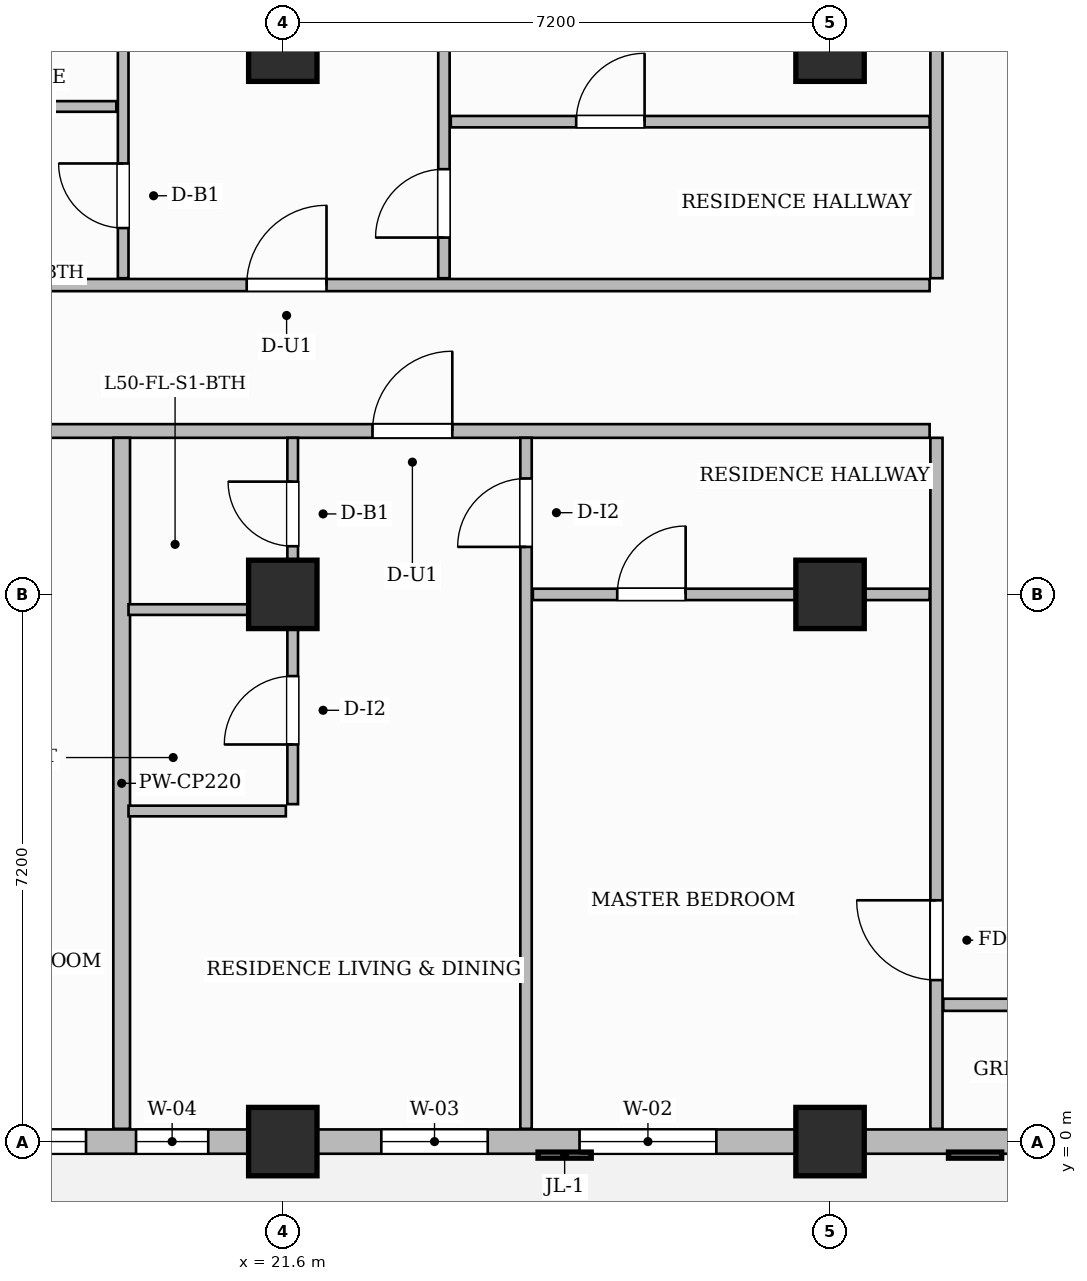
"""IFC4 building model, lengths in metres.
Left out: names, types, materials, properties, quantities, classifications, styles, units other than length and angle.
Written with IfcOpenShell. Run it as: python <this file> out.ifc"""

import sys

from ifc_helpers import new_model, si_unit, direction, frame, frame_2d, origin, origin_2d, place, context, subcontext, project, spatial, rectangle, extrude, source, transform, mapped, element, fill, save


model = new_model("IFC4")
c1 = context("Model", 3, precision=1e-05, world=origin(), true_north=direction((0.0, 1.0)))
c2 = subcontext(c1, "Body", "Model", "MODEL_VIEW")
j1 = project(units=[si_unit("LENGTHUNIT", "METRE"), si_unit("PLANEANGLEUNIT", "RADIAN")], contexts=[c1])
p1 = place(None, origin())
s1 = spatial("IfcSite", under=j1, at=p1, CompositionType="ELEMENT")
p2 = place(p1, origin())
s2 = spatial("IfcBuilding", under=s1, at=p2, CompositionType="ELEMENT")
p3 = place(p2, frame((0.0, 0.0, 201.9)))
s3 = spatial("IfcBuildingStorey", under=s2, at=p3, CompositionType="ELEMENT", Elevation=201.9)
m1 = source(origin(), c2, "Body", "SweptSolid", [
    extrude(rectangle(XDim=0.9, YDim=0.9, at=origin_2d()), origin(), (0.0, 0.0, 1.0), 3.85),
])
for number, where, z_axis, x_axis in (
    (1, (21.6, 0.0, 0.0), (0.0, 0.0, 1.0), (1.0, 0.0, 0.0)),
    (2, (21.6, 7.2, 0.0), (0.0, 0.0, 1.0), (1.0, 0.0, 0.0)),
    (3, (21.6, 14.4, 0.0), (0.0, 0.0, 1.0), (1.0, 0.0, 0.0)),
    (4, (28.8, 0.0, 0.0), (0.0, 0.0, 1.0), (1.0, 0.0, 0.0)),
    (5, (28.8, 7.2, 0.0), (0.0, 0.0, 1.0), (1.0, 0.0, 0.0)),
    (6, (28.8, 14.4, 0.0), (0.0, 0.0, 1.0), (1.0, 0.0, 0.0)),
):
    element("IfcColumn", number, at=place(p3, frame(where, z_axis=z_axis, x_axis=x_axis)), inside=s3, PredefinedType="COLUMN", context=c2, shape_type="MappedRepresentation", body=[
        mapped(m1, transform((0.0, 0.0, 0.0), scale=1.0)),
    ])
p4 = place(p3, frame((14.568, 9.35, 0.0), z_axis=(0.0, 0.0, 1.0), x_axis=(1.0, 0.0, 0.0)))
e7 = element("IfcWall", 7, at=p4, inside=s3, PredefinedType="PARTITIONING", context=c2, shape_type="SweptSolid", body=[
    extrude(rectangle(XDim=15.542, YDim=0.18, at=frame_2d((7.771, 0.0))), origin(), (0.0, 0.0, 1.0), 3.6),
])
p5 = place(p4, frame((2.888, 0.0, 0.0)))
e8 = element("IfcOpeningElement", 8, at=p5, cuts=e7, PredefinedType="OPENING", context=c2, shape_type="SweptSolid", body=[
    extrude(rectangle(XDim=1.0, YDim=2.2, at=frame_2d((0.5, 1.1))), frame((0.0, 0.1, 0.0), z_axis=(0.0, -1.0, 0.0), x_axis=(1.0, 0.0, 0.0)), (0.0, 0.0, 1.0), 0.2),
])
p6 = place(p4, frame((8.212, 0.0, 0.0)))
e9 = element("IfcOpeningElement", 9, at=p6, cuts=e7, PredefinedType="OPENING", context=c2, shape_type="SweptSolid", body=[
    extrude(rectangle(XDim=1.05, YDim=2.25, at=frame_2d((0.525, 1.125))), frame((0.0, 0.1, 0.0), z_axis=(0.0, -1.0, 0.0), x_axis=(1.0, 0.0, 0.0)), (0.0, 0.0, 1.0), 0.2),
])
p7 = place(p3, frame((14.568, 11.27, 0.0), z_axis=(0.0, 0.0, 1.0), x_axis=(1.0, 0.0, 0.0)))
e10 = element("IfcWall", 10, at=p7, inside=s3, PredefinedType="PARTITIONING", context=c2, shape_type="SweptSolid", body=[
    extrude(rectangle(XDim=15.542, YDim=0.16, at=frame_2d((7.771, 0.0))), origin(), (0.0, 0.0, 1.0), 3.6),
])
p8 = place(p7, frame((6.557, 0.0, 0.0)))
e11 = element("IfcOpeningElement", 11, at=p8, cuts=e10, PredefinedType="OPENING", context=c2, shape_type="SweptSolid", body=[
    extrude(rectangle(XDim=1.05, YDim=2.25, at=frame_2d((0.525, 1.125))), frame((0.0, 0.09, 0.0), z_axis=(0.0, -1.0, 0.0), x_axis=(1.0, 0.0, 0.0)), (0.0, 0.0, 1.0), 0.18),
])
p9 = place(p3, frame((30.2, 11.36, 0.0), z_axis=(0.0, 0.0, 1.0), x_axis=(0.0, 1.0, 0.0)))
e12 = element("IfcWall", 12, at=p9, inside=s3, PredefinedType="PARTITIONING", context=c2, shape_type="SweptSolid", body=[
    extrude(rectangle(XDim=10.1, YDim=0.16, at=frame_2d((5.05, 0.0))), origin(), (0.0, 0.0, 1.0), 3.6),
])
p10 = place(p3, frame((30.2, 0.168, 0.0), z_axis=(0.0, 0.0, 1.0), x_axis=(0.0, 1.0, 0.0)))
e13 = element("IfcWall", 13, at=p10, inside=s3, PredefinedType="PARTITIONING", context=c2, shape_type="SweptSolid", body=[
    extrude(rectangle(XDim=9.092, YDim=0.16, at=frame_2d((4.546, 0.0))), origin(), (0.0, 0.0, 1.0), 3.6),
])
p11 = place(p10, frame((1.957, 0.0, 0.0)))
e14 = element("IfcOpeningElement", 14, at=p11, cuts=e13, PredefinedType="OPENING", context=c2, shape_type="SweptSolid", body=[
    extrude(rectangle(XDim=1.05, YDim=2.15, at=frame_2d((0.525, 1.075))), frame((0.0, 0.09, 0.0), z_axis=(0.0, -1.0, 0.0), x_axis=(1.0, 0.0, 0.0)), (0.0, 0.0, 1.0), 0.18),
])
p12 = place(p3, frame((30.29, 1.8, 0.0), z_axis=(0.0, 0.0, 1.0), x_axis=(1.0, 0.0, 0.0)))
e15 = element("IfcWall", 15, at=p12, inside=s3, PredefinedType="PARTITIONING", context=c2, shape_type="SweptSolid", body=[
    extrude(rectangle(XDim=19.37, YDim=0.16, at=frame_2d((9.685, 0.0))), origin(), (0.0, 0.0, 1.0), 3.6),
])
p13 = place(p12, frame((5.074, 0.0, 0.0)))
e16 = element("IfcOpeningElement", 16, at=p13, cuts=e15, PredefinedType="OPENING", context=c2, shape_type="SweptSolid", body=[
    extrude(rectangle(XDim=0.9, YDim=2.15, at=frame_2d((0.45, 1.075))), frame((0.0, 0.09, 0.0), z_axis=(0.0, -1.0, 0.0), x_axis=(1.0, 0.0, 0.0)), (0.0, 0.0, 1.0), 0.18),
])
p14 = place(p12, frame((14.06, 0.0, 0.0)))
e17 = element("IfcOpeningElement", 17, at=p14, cuts=e15, PredefinedType="OPENING", context=c2, shape_type="SweptSolid", body=[
    extrude(rectangle(XDim=0.9, YDim=2.15, at=frame_2d((0.45, 1.075))), frame((0.0, 0.09, 0.0), z_axis=(0.0, -1.0, 0.0), x_axis=(1.0, 0.0, 0.0)), (0.0, 0.0, 1.0), 0.18),
])
p15 = place(p3, frame((19.48, 0.168, 0.0), z_axis=(0.0, 0.0, 1.0), x_axis=(0.0, 1.0, 0.0)))
e18 = element("IfcWall", 18, at=p15, inside=s3, PredefinedType="PARTITIONING", context=c2, shape_type="SweptSolid", body=[
    extrude(rectangle(XDim=9.092, YDim=0.22, at=frame_2d((4.546, 0.0))), origin(), (0.0, 0.0, 1.0), 3.6),
])
p16 = place(p3, frame((21.73, 4.44, 0.0), z_axis=(0.0, 0.0, 1.0), x_axis=(0.0, 1.0, 0.0)))
e19 = element("IfcWall", 19, at=p16, inside=s3, PredefinedType="PARTITIONING", context=c2, shape_type="SweptSolid", body=[
    extrude(rectangle(XDim=4.82, YDim=0.14, at=frame_2d((2.41, 0.0))), origin(), (0.0, 0.0, 1.0), 3.085),
])
p17 = place(p16, frame((0.785, 0.0, 0.0)))
e20 = element("IfcOpeningElement", 20, at=p17, cuts=e19, PredefinedType="OPENING", context=c2, shape_type="SweptSolid", body=[
    extrude(rectangle(XDim=0.9, YDim=2.15, at=frame_2d((0.45, 1.075))), frame((0.0, 0.08, 0.0), z_axis=(0.0, -1.0, 0.0), x_axis=(1.0, 0.0, 0.0)), (0.0, 0.0, 1.0), 0.16),
])
p18 = place(p16, frame((3.394, 0.0, 0.0)))
e21 = element("IfcOpeningElement", 21, at=p18, cuts=e19, PredefinedType="OPENING", context=c2, shape_type="SweptSolid", body=[
    extrude(rectangle(XDim=0.85, YDim=2.1, at=frame_2d((0.425, 1.05))), frame((0.0, 0.08, 0.0), z_axis=(0.0, -1.0, 0.0), x_axis=(1.0, 0.0, 0.0)), (0.0, 0.0, 1.0), 0.16),
])
p19 = place(p3, frame((19.57, 7.0, 0.0), z_axis=(0.0, 0.0, 1.0), x_axis=(1.0, 0.0, 0.0)))
e22 = element("IfcWall", 22, at=p19, inside=s3, PredefinedType="PARTITIONING", context=c2, shape_type="SweptSolid", body=[
    extrude(rectangle(XDim=2.07, YDim=0.14, at=frame_2d((1.035, 0.0))), origin(), (0.0, 0.0, 1.0), 3.085),
])
p20 = place(p3, frame((19.57, 4.35, 0.0), z_axis=(0.0, 0.0, 1.0), x_axis=(1.0, 0.0, 0.0)))
e23 = element("IfcWall", 23, at=p20, inside=s3, PredefinedType="PARTITIONING", context=c2, shape_type="SweptSolid", body=[
    extrude(rectangle(XDim=2.07, YDim=0.14, at=frame_2d((1.035, 0.0))), origin(), (0.0, 0.0, 1.0), 3.6),
])
p21 = place(p3, frame((24.8, 0.168, 0.0), z_axis=(0.0, 0.0, 1.0), x_axis=(0.0, 1.0, 0.0)))
e24 = element("IfcWall", 24, at=p21, inside=s3, PredefinedType="PARTITIONING", context=c2, shape_type="SweptSolid", body=[
    extrude(rectangle(XDim=9.092, YDim=0.15, at=frame_2d((4.546, 0.0))), origin(), (0.0, 0.0, 1.0), 3.6),
])
p22 = place(p21, frame((7.657, 0.0, 0.0)))
e25 = element("IfcOpeningElement", 25, at=p22, cuts=e24, PredefinedType="OPENING", context=c2, shape_type="SweptSolid", body=[
    extrude(rectangle(XDim=0.9, YDim=2.15, at=frame_2d((0.45, 1.075))), frame((0.0, 0.085, 0.0), z_axis=(0.0, -1.0, 0.0), x_axis=(1.0, 0.0, 0.0)), (0.0, 0.0, 1.0), 0.17),
])
p23 = place(p3, frame((24.89, 7.2, 0.0), z_axis=(0.0, 0.0, 1.0), x_axis=(1.0, 0.0, 0.0)))
e26 = element("IfcWall", 26, at=p23, inside=s3, PredefinedType="PARTITIONING", context=c2, shape_type="SweptSolid", body=[
    extrude(rectangle(XDim=5.22, YDim=0.15, at=frame_2d((2.61, 0.0))), origin(), (0.0, 0.0, 1.0), 3.085),
])
p24 = place(p23, frame((1.11, 0.0, 0.0)))
e27 = element("IfcOpeningElement", 27, at=p24, cuts=e26, PredefinedType="OPENING", context=c2, shape_type="SweptSolid", body=[
    extrude(rectangle(XDim=0.9, YDim=2.15, at=frame_2d((0.45, 1.075))), frame((0.0, 0.085, 0.0), z_axis=(0.0, -1.0, 0.0), x_axis=(1.0, 0.0, 0.0)), (0.0, 0.0, 1.0), 0.17),
])
p25 = place(p3, frame((19.5, 11.36, 0.0), z_axis=(0.0, 0.0, 1.0), x_axis=(0.0, 1.0, 0.0)))
e28 = element("IfcWall", 28, at=p25, inside=s3, PredefinedType="PARTITIONING", context=c2, shape_type="SweptSolid", body=[
    extrude(rectangle(XDim=4.82, YDim=0.14, at=frame_2d((2.41, 0.0))), origin(), (0.0, 0.0, 1.0), 3.6),
])
p26 = place(p25, frame((0.66, 0.0, 0.0)))
e29 = element("IfcOpeningElement", 29, at=p26, cuts=e28, PredefinedType="OPENING", context=c2, shape_type="SweptSolid", body=[
    extrude(rectangle(XDim=0.85, YDim=2.1, at=frame_2d((0.425, 1.05))), frame((0.0, 0.08, 0.0), z_axis=(0.0, -1.0, 0.0), x_axis=(1.0, 0.0, 0.0)), (0.0, 0.0, 1.0), 0.16),
])
p27 = place(p25, frame((3.135, 0.0, 0.0)))
e30 = element("IfcOpeningElement", 30, at=p27, cuts=e28, PredefinedType="OPENING", context=c2, shape_type="SweptSolid", body=[
    extrude(rectangle(XDim=0.9, YDim=2.15, at=frame_2d((0.45, 1.075))), frame((0.0, 0.08, 0.0), z_axis=(0.0, -1.0, 0.0), x_axis=(1.0, 0.0, 0.0)), (0.0, 0.0, 1.0), 0.16),
])
p28 = place(p3, frame((17.34, 13.62, 0.0), z_axis=(0.0, 0.0, 1.0), x_axis=(1.0, 0.0, 0.0)))
e31 = element("IfcWall", 31, at=p28, inside=s3, PredefinedType="PARTITIONING", context=c2, shape_type="SweptSolid", body=[
    extrude(rectangle(XDim=2.07, YDim=0.14, at=frame_2d((1.035, 0.0))), origin(), (0.0, 0.0, 1.0), 3.6),
])
p29 = place(p3, frame((23.72, 11.36, 0.0), z_axis=(0.0, 0.0, 1.0), x_axis=(0.0, 1.0, 0.0)))
e32 = element("IfcWall", 32, at=p29, inside=s3, PredefinedType="PARTITIONING", context=c2, shape_type="SweptSolid", body=[
    extrude(rectangle(XDim=10.1, YDim=0.15, at=frame_2d((5.05, 0.0))), origin(), (0.0, 0.0, 1.0), 3.6),
])
p30 = place(p29, frame((0.535, 0.0, 0.0)))
e33 = element("IfcOpeningElement", 33, at=p30, cuts=e32, PredefinedType="OPENING", context=c2, shape_type="SweptSolid", body=[
    extrude(rectangle(XDim=0.9, YDim=2.15, at=frame_2d((0.45, 1.075))), frame((0.0, 0.085, 0.0), z_axis=(0.0, -1.0, 0.0), x_axis=(1.0, 0.0, 0.0)), (0.0, 0.0, 1.0), 0.17),
])
p31 = place(p3, frame((23.81, 13.42, 0.0), z_axis=(0.0, 0.0, 1.0), x_axis=(1.0, 0.0, 0.0)))
e34 = element("IfcWall", 34, at=p31, inside=s3, PredefinedType="PARTITIONING", context=c2, shape_type="SweptSolid", body=[
    extrude(rectangle(XDim=6.3, YDim=0.15, at=frame_2d((3.15, 0.0))), origin(), (0.0, 0.0, 1.0), 3.6),
])
p32 = place(p31, frame((1.65, 0.0, 0.0)))
e35 = element("IfcOpeningElement", 35, at=p32, cuts=e34, PredefinedType="OPENING", context=c2, shape_type="SweptSolid", body=[
    extrude(rectangle(XDim=0.9, YDim=2.15, at=frame_2d((0.45, 1.075))), frame((0.0, 0.085, 0.0), z_axis=(0.0, -1.0, 0.0), x_axis=(1.0, 0.0, 0.0)), (0.0, 0.0, 1.0), 0.17),
])
p33 = place(p3, frame((14.4, 0.0, 0.0), z_axis=(0.0, 0.0, 1.0), x_axis=(1.0, 0.0, 0.0)))
e36 = element("IfcWall", 36, at=p33, inside=s3, PredefinedType="SOLIDWALL", context=c2, shape_type="SweptSolid", body=[
    extrude(rectangle(XDim=35.4, YDim=0.32, at=frame_2d((17.7, 0.0))), origin(), (0.0, 0.0, 1.0), 3.085),
])
p34 = place(p33, frame((0.85, 0.0, 0.0)))
e37 = element("IfcOpeningElement", 37, at=p34, cuts=e36, PredefinedType="OPENING", context=c2, shape_type="SweptSolid", body=[
    extrude(rectangle(XDim=1.2, YDim=2.2, at=frame_2d((0.6, 1.1))), frame((0.0, 0.17, 0.0), z_axis=(0.0, -1.0, 0.0), x_axis=(1.0, 0.0, 0.0)), (0.0, 0.0, 1.0), 0.34),
])
p35 = place(p33, frame((2.811, 0.0, 0.8)))
e38 = element("IfcOpeningElement", 38, at=p35, cuts=e36, PredefinedType="OPENING", context=c2, shape_type="SweptSolid", body=[
    extrude(rectangle(XDim=1.8, YDim=1.85, at=frame_2d((0.9, 0.925))), frame((0.0, 0.17, 0.0), z_axis=(0.0, -1.0, 0.0), x_axis=(1.0, 0.0, 0.0)), (0.0, 0.0, 1.0), 0.34),
])
p36 = place(p33, frame((5.269, 0.0, 0.8)))
e39 = element("IfcOpeningElement", 39, at=p36, cuts=e36, PredefinedType="OPENING", context=c2, shape_type="SweptSolid", body=[
    extrude(rectangle(XDim=0.95, YDim=1.75, at=frame_2d((0.475, 0.875))), frame((0.0, 0.17, 0.0), z_axis=(0.0, -1.0, 0.0), x_axis=(1.0, 0.0, 0.0)), (0.0, 0.0, 1.0), 0.34),
])
p37 = place(p33, frame((8.496, 0.0, 0.8)))
e40 = element("IfcOpeningElement", 40, at=p37, cuts=e36, PredefinedType="OPENING", context=c2, shape_type="SweptSolid", body=[
    extrude(rectangle(XDim=1.4, YDim=1.85, at=frame_2d((0.7, 0.925))), frame((0.0, 0.17, 0.0), z_axis=(0.0, -1.0, 0.0), x_axis=(1.0, 0.0, 0.0)), (0.0, 0.0, 1.0), 0.34),
])
p38 = place(p33, frame((11.104, 0.0, 0.8)))
e41 = element("IfcOpeningElement", 41, at=p38, cuts=e36, PredefinedType="OPENING", context=c2, shape_type="SweptSolid", body=[
    extrude(rectangle(XDim=1.8, YDim=1.85, at=frame_2d((0.9, 0.925))), frame((0.0, 0.17, 0.0), z_axis=(0.0, -1.0, 0.0), x_axis=(1.0, 0.0, 0.0)), (0.0, 0.0, 1.0), 0.34),
])
p39 = place(p33, frame((16.804, 0.0, 0.8)))
e42 = element("IfcOpeningElement", 42, at=p39, cuts=e36, PredefinedType="OPENING", context=c2, shape_type="SweptSolid", body=[
    extrude(rectangle(XDim=1.8, YDim=1.85, at=frame_2d((0.9, 0.925))), frame((0.0, 0.17, 0.0), z_axis=(0.0, -1.0, 0.0), x_axis=(1.0, 0.0, 0.0)), (0.0, 0.0, 1.0), 0.34),
])
p40 = place(p33, frame((22.396, 0.0, 0.8)))
e43 = element("IfcOpeningElement", 43, at=p40, cuts=e36, PredefinedType="OPENING", context=c2, shape_type="SweptSolid", body=[
    extrude(rectangle(XDim=1.8, YDim=1.85, at=frame_2d((0.9, 0.925))), frame((0.0, 0.17, 0.0), z_axis=(0.0, -1.0, 0.0), x_axis=(1.0, 0.0, 0.0)), (0.0, 0.0, 1.0), 0.34),
])
p41 = place(p33, frame((25.629, 0.0, 0.8)))
e44 = element("IfcOpeningElement", 44, at=p41, cuts=e36, PredefinedType="OPENING", context=c2, shape_type="SweptSolid", body=[
    extrude(rectangle(XDim=0.95, YDim=1.75, at=frame_2d((0.475, 0.875))), frame((0.0, 0.17, 0.0), z_axis=(0.0, -1.0, 0.0), x_axis=(1.0, 0.0, 0.0)), (0.0, 0.0, 1.0), 0.34),
])
p42 = place(p33, frame((29.075, 0.0, 0.8)))
e45 = element("IfcOpeningElement", 45, at=p42, cuts=e36, PredefinedType="OPENING", context=c2, shape_type="SweptSolid", body=[
    extrude(rectangle(XDim=1.8, YDim=1.85, at=frame_2d((0.9, 0.925))), frame((0.0, 0.17, 0.0), z_axis=(0.0, -1.0, 0.0), x_axis=(1.0, 0.0, 0.0)), (0.0, 0.0, 1.0), 0.34),
])
p43 = place(p33, frame((32.125, 0.0, 0.8)))
e46 = element("IfcOpeningElement", 46, at=p43, cuts=e36, PredefinedType="OPENING", context=c2, shape_type="SweptSolid", body=[
    extrude(rectangle(XDim=1.8, YDim=1.85, at=frame_2d((0.9, 0.925))), frame((0.0, 0.17, 0.0), z_axis=(0.0, -1.0, 0.0), x_axis=(1.0, 0.0, 0.0)), (0.0, 0.0, 1.0), 0.34),
])
m2 = source(origin(), c2, "Body", "SweptSolid", [
    extrude(rectangle(XDim=1.05, YDim=2.15, at=frame_2d((0.525, 1.075))), frame((0.0, 0.025, 0.0), z_axis=(0.0, -1.0, 0.0), x_axis=(1.0, 0.0, 0.0)), (0.0, 0.0, 1.0), 0.05),
])
p44 = place(p11, origin())
e47 = element("IfcDoor", 47, at=p44, inside=s3, OperationType="SINGLE_SWING_RIGHT", PredefinedType="DOOR", context=c2, shape_type="MappedRepresentation", body=[
    mapped(m2, transform((0.0, 0.0, 0.0), scale=1.0)),
])
fill(e14, e47)
m3 = source(origin(), c2, "Body", "SweptSolid", [
    extrude(rectangle(XDim=0.9, YDim=2.15, at=frame_2d((0.45, 1.075))), frame((0.0, 0.025, 0.0), z_axis=(0.0, -1.0, 0.0), x_axis=(1.0, 0.0, 0.0)), (0.0, 0.0, 1.0), 0.05),
])
p45 = place(p17, origin())
e48 = element("IfcDoor", 48, at=p45, inside=s3, OperationType="SINGLE_SWING_LEFT", PredefinedType="DOOR", context=c2, shape_type="MappedRepresentation", body=[
    mapped(m3, transform((0.0, 0.0, 0.0), scale=1.0)),
])
fill(e20, e48)
m4 = source(origin(), c2, "Body", "SweptSolid", [
    extrude(rectangle(XDim=0.85, YDim=2.1, at=frame_2d((0.425, 1.05))), frame((0.0, 0.025, 0.0), z_axis=(0.0, -1.0, 0.0), x_axis=(1.0, 0.0, 0.0)), (0.0, 0.0, 1.0), 0.05),
])
p46 = place(p18, origin())
e49 = element("IfcDoor", 49, at=p46, inside=s3, OperationType="SINGLE_SWING_RIGHT", PredefinedType="DOOR", context=c2, shape_type="MappedRepresentation", body=[
    mapped(m4, transform((0.0, 0.0, 0.0), scale=1.0)),
])
fill(e21, e49)
m5 = source(origin(), c2, "Body", "SweptSolid", [
    extrude(rectangle(XDim=1.05, YDim=2.25, at=frame_2d((0.525, 1.125))), frame((0.0, 0.025, 0.0), z_axis=(0.0, -1.0, 0.0), x_axis=(1.0, 0.0, 0.0)), (0.0, 0.0, 1.0), 0.05),
])
p47 = place(p6, origin())
e50 = element("IfcDoor", 50, at=p47, inside=s3, OperationType="SINGLE_SWING_RIGHT", PredefinedType="DOOR", context=c2, shape_type="MappedRepresentation", body=[
    mapped(m5, transform((0.0, 0.0, 0.0), scale=1.0)),
])
fill(e9, e50)
p48 = place(p22, origin())
e51 = element("IfcDoor", 51, at=p48, inside=s3, OperationType="SINGLE_SWING_LEFT", PredefinedType="DOOR", context=c2, shape_type="MappedRepresentation", body=[
    mapped(m3, transform((0.0, 0.0, 0.0), scale=1.0)),
])
fill(e25, e51)
p49 = place(p24, origin())
e52 = element("IfcDoor", 52, at=p49, inside=s3, OperationType="SINGLE_SWING_RIGHT", PredefinedType="DOOR", context=c2, shape_type="MappedRepresentation", body=[
    mapped(m3, transform((0.0, 0.0, 0.0), scale=1.0)),
])
fill(e27, e52)
p50 = place(p26, origin())
e53 = element("IfcDoor", 53, at=p50, inside=s3, OperationType="SINGLE_SWING_RIGHT", PredefinedType="DOOR", context=c2, shape_type="MappedRepresentation", body=[
    mapped(m4, transform((0.0, 0.0, 0.0), scale=1.0)),
])
fill(e29, e53)
p51 = place(p8, origin())
e54 = element("IfcDoor", 54, at=p51, inside=s3, OperationType="SINGLE_SWING_RIGHT", PredefinedType="DOOR", context=c2, shape_type="MappedRepresentation", body=[
    mapped(m5, transform((0.0, 0.0, 0.0), scale=1.0)),
])
fill(e11, e54)
p52 = place(p30, origin())
e55 = element("IfcDoor", 55, at=p52, inside=s3, OperationType="SINGLE_SWING_LEFT", PredefinedType="DOOR", context=c2, shape_type="MappedRepresentation", body=[
    mapped(m3, transform((0.0, 0.0, 0.0), scale=1.0)),
])
fill(e33, e55)
p53 = place(p32, origin())
e56 = element("IfcDoor", 56, at=p53, inside=s3, OperationType="SINGLE_SWING_RIGHT", PredefinedType="DOOR", context=c2, shape_type="MappedRepresentation", body=[
    mapped(m3, transform((0.0, 0.0, 0.0), scale=1.0)),
])
fill(e35, e56)
m6 = source(origin(), c2, "Body", "SweptSolid", [
    extrude(rectangle(XDim=1.8, YDim=1.85, at=frame_2d((0.9, 0.925))), frame((0.0, 0.03, 0.0), z_axis=(0.0, -1.0, 0.0), x_axis=(1.0, 0.0, 0.0)), (0.0, 0.0, 1.0), 0.06),
])
p54 = place(p35, origin())
e57 = element("IfcWindow", 57, at=p54, inside=s3, PartitioningType="DOUBLE_PANEL_VERTICAL", PredefinedType="WINDOW", context=c2, shape_type="MappedRepresentation", body=[
    mapped(m6, transform((0.0, 0.0, 0.0), scale=1.0)),
])
fill(e38, e57)
m7 = source(origin(), c2, "Body", "SweptSolid", [
    extrude(rectangle(XDim=0.95, YDim=1.75, at=frame_2d((0.475, 0.875))), frame((0.0, 0.03, 0.0), z_axis=(0.0, -1.0, 0.0), x_axis=(1.0, 0.0, 0.0)), (0.0, 0.0, 1.0), 0.06),
])
p55 = place(p36, origin())
e58 = element("IfcWindow", 58, at=p55, inside=s3, PartitioningType="SINGLE_PANEL", PredefinedType="WINDOW", context=c2, shape_type="MappedRepresentation", body=[
    mapped(m7, transform((0.0, 0.0, 0.0), scale=1.0)),
])
fill(e39, e58)
m8 = source(origin(), c2, "Body", "SweptSolid", [
    extrude(rectangle(XDim=1.4, YDim=1.85, at=frame_2d((0.7, 0.925))), frame((0.0, 0.03, 0.0), z_axis=(0.0, -1.0, 0.0), x_axis=(1.0, 0.0, 0.0)), (0.0, 0.0, 1.0), 0.06),
])
p56 = place(p37, origin())
e59 = element("IfcWindow", 59, at=p56, inside=s3, PartitioningType="SINGLE_PANEL", PredefinedType="WINDOW", context=c2, shape_type="MappedRepresentation", body=[
    mapped(m8, transform((0.0, 0.0, 0.0), scale=1.0)),
])
fill(e40, e59)
p57 = place(p38, origin())
e60 = element("IfcWindow", 60, at=p57, inside=s3, PartitioningType="DOUBLE_PANEL_VERTICAL", PredefinedType="WINDOW", context=c2, shape_type="MappedRepresentation", body=[
    mapped(m6, transform((0.0, 0.0, 0.0), scale=1.0)),
])
fill(e41, e60)
save(model, sys.argv[1])
